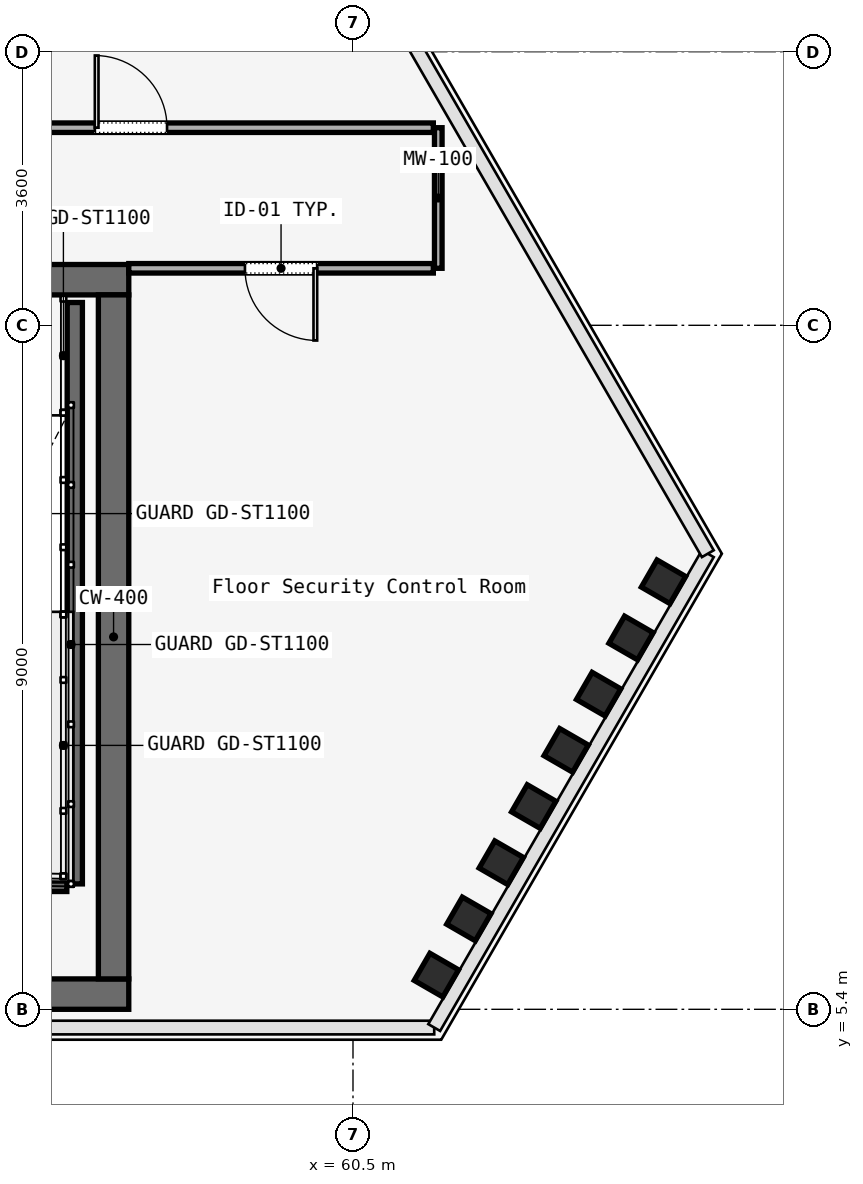
"""IFC4 building model, lengths in metres.
Left out: names, types, materials, properties, quantities, classifications, styles, units other than length and angle.
Written with IfcOpenShell. Run it as: python <this file> out.ifc"""

import sys

from ifc_helpers import new_model, si_unit, direction, frame, frame_2d, origin, origin_2d, place, context, subcontext, project, spatial, rectangle, i_section, extrude, element, fill, save


model = new_model("IFC4")
c1 = context("Model", 3, precision=1e-05, world=origin(), true_north=direction((0.0, 1.0)))
c2 = subcontext(c1, "Body", "Model", "MODEL_VIEW")
j1 = project(units=[si_unit("LENGTHUNIT", "METRE"), si_unit("PLANEANGLEUNIT", "RADIAN")], contexts=[c1])
p1 = place(None, origin())
s1 = spatial("IfcSite", under=j1, at=p1, CompositionType="ELEMENT")
p2 = place(p1, origin())
s2 = spatial("IfcBuilding", under=s1, at=p2, CompositionType="ELEMENT")
p3 = place(p2, frame((0.0, 0.0, 233.2)))
s3 = spatial("IfcBuildingStorey", under=s2, at=p3, CompositionType="ELEMENT", Elevation=233.2)
p4 = place(p3, frame((26.45, 15.0, 0.0), z_axis=(0.0, 0.0, 1.0), x_axis=(1.0, 0.0, 0.0)))
e1 = element("IfcWall", 1, at=p4, inside=s3, PredefinedType="SOLIDWALL", context=c2, shape_type="SweptSolid", body=[
    extrude(rectangle(XDim=31.1, YDim=0.4, at=frame_2d((15.55, 0.0))), origin(), (0.0, 0.0, 1.0), 3.58),
])
p5 = place(p4, frame((1.65, 0.0, 0.0)))
e2 = element("IfcOpeningElement", 2, at=p5, cuts=e1, PredefinedType="OPENING", context=c2, shape_type="SweptSolid", body=[
    extrude(rectangle(XDim=1.1, YDim=2.2, at=frame_2d((0.55, 1.1))), frame((0.0, 0.2, 0.0), z_axis=(0.0, -1.0, 0.0), x_axis=(1.0, 0.0, 0.0)), (0.0, 0.0, 1.0), 0.4),
])
p6 = place(p4, frame((13.65, 0.0, 0.0)))
e3 = element("IfcOpeningElement", 3, at=p6, cuts=e1, PredefinedType="OPENING", context=c2, shape_type="SweptSolid", body=[
    extrude(rectangle(XDim=1.1, YDim=2.2, at=frame_2d((0.55, 1.1))), frame((0.0, 0.2, 0.0), z_axis=(0.0, -1.0, 0.0), x_axis=(1.0, 0.0, 0.0)), (0.0, 0.0, 1.0), 0.4),
])
p7 = place(p4, frame((25.55, 0.0, 0.0)))
e4 = element("IfcOpeningElement", 4, at=p7, cuts=e1, PredefinedType="OPENING", context=c2, shape_type="SweptSolid", body=[
    extrude(rectangle(XDim=1.1, YDim=2.2, at=frame_2d((0.55, 1.1))), frame((0.0, 0.2, 0.0), z_axis=(0.0, -1.0, 0.0), x_axis=(1.0, 0.0, 0.0)), (0.0, 0.0, 1.0), 0.4),
])
p8 = place(p4, frame((19.35, 0.0, 0.0)))
e5 = element("IfcOpeningElement", 5, at=p8, cuts=e1, PredefinedType="OPENING", context=c2, shape_type="SweptSolid", body=[
    extrude(rectangle(XDim=1.1, YDim=2.2, at=frame_2d((0.55, 1.1))), frame((0.0, 0.2, 0.0), z_axis=(0.0, -1.0, 0.0), x_axis=(1.0, 0.0, 0.0)), (0.0, 0.0, 1.0), 0.4),
])
p9 = place(p4, frame((21.4, 0.0, 0.0)))
e6 = element("IfcOpeningElement", 6, at=p9, cuts=e1, PredefinedType="OPENING", context=c2, shape_type="SweptSolid", body=[
    extrude(rectangle(XDim=0.9, YDim=2.1, at=frame_2d((0.45, 1.05))), frame((0.0, 0.2, 0.0), z_axis=(0.0, -1.0, 0.0), x_axis=(1.0, 0.0, 0.0)), (0.0, 0.0, 1.0), 0.4),
])
p10 = place(p4, frame((5.14, 0.0, 0.0)))
e7 = element("IfcOpeningElement", 7, at=p10, cuts=e1, PredefinedType="OPENING", context=c2, shape_type="SweptSolid", body=[
    extrude(rectangle(XDim=0.95, YDim=2.2, at=frame_2d((0.475, 1.1))), frame((0.0, 0.2, 0.0), z_axis=(0.0, -1.0, 0.0), x_axis=(1.0, 0.0, 0.0)), (0.0, 0.0, 1.0), 0.4),
])
p11 = place(p4, frame((7.825, 0.0, 0.0)))
e8 = element("IfcOpeningElement", 8, at=p11, cuts=e1, PredefinedType="OPENING", context=c2, shape_type="SweptSolid", body=[
    extrude(rectangle(XDim=0.95, YDim=2.2, at=frame_2d((0.475, 1.1))), frame((0.0, 0.2, 0.0), z_axis=(0.0, -1.0, 0.0), x_axis=(1.0, 0.0, 0.0)), (0.0, 0.0, 1.0), 0.4),
])
p12 = place(p4, frame((10.46, 0.0, 0.0)))
e9 = element("IfcOpeningElement", 9, at=p12, cuts=e1, PredefinedType="OPENING", context=c2, shape_type="SweptSolid", body=[
    extrude(rectangle(XDim=0.95, YDim=2.2, at=frame_2d((0.475, 1.1))), frame((0.0, 0.2, 0.0), z_axis=(0.0, -1.0, 0.0), x_axis=(1.0, 0.0, 0.0)), (0.0, 0.0, 1.0), 0.4),
])
p13 = place(p4, frame((23.35, 0.0, 0.0)))
e10 = element("IfcOpeningElement", 10, at=p13, cuts=e1, PredefinedType="OPENING", context=c2, shape_type="SweptSolid", body=[
    extrude(rectangle(XDim=1.3, YDim=2.3, at=frame_2d((0.65, 1.15))), frame((0.0, 0.2, 0.0), z_axis=(0.0, -1.0, 0.0), x_axis=(1.0, 0.0, 0.0)), (0.0, 0.0, 1.0), 0.4),
])
p14 = place(p3, frame((26.45, 5.6, 0.0), z_axis=(0.0, 0.0, 1.0), x_axis=(1.0, 0.0, 0.0)))
e11 = element("IfcWall", 11, at=p14, inside=s3, PredefinedType="SOLIDWALL", context=c2, shape_type="SweptSolid", body=[
    extrude(rectangle(XDim=31.1, YDim=0.4, at=frame_2d((15.55, 0.0))), origin(), (0.0, 0.0, 1.0), 3.58),
])
p15 = place(p3, frame((57.35, 5.8, 0.0), z_axis=(0.0, 0.0, 1.0), x_axis=(0.0, 1.0, 0.0)))
e12 = element("IfcWall", 12, at=p15, inside=s3, PredefinedType="SOLIDWALL", context=c2, shape_type="SweptSolid", body=[
    extrude(rectangle(XDim=9.0, YDim=0.4, at=frame_2d((4.5, 0.0))), origin(), (0.0, 0.0, 1.0), 3.58),
])
for number, where, z_axis, x_axis in (
    (13, (61.597, 5.85, 0.0), (0.0, 0.0, 1.0), (0.5, 0.866, 0.0)),
    (14, (62.024, 6.589, 0.0), (0.0, 0.0, 1.0), (0.5, 0.866, 0.0)),
    (15, (62.451, 7.328, 0.0), (0.0, 0.0, 1.0), (0.5, 0.866, 0.0)),
    (16, (62.878, 8.068, 0.0), (0.0, 0.0, 1.0), (0.5, 0.866, 0.0)),
    (17, (63.305, 8.807, 0.0), (0.0, 0.0, 1.0), (0.5, 0.866, 0.0)),
    (18, (63.732, 9.546, 0.0), (0.0, 0.0, 1.0), (0.5, 0.866, 0.0)),
    (19, (64.158, 10.286, 0.0), (0.0, 0.0, 1.0), (0.5, 0.866, 0.0)),
    (20, (64.585, 11.025, 0.0), (0.0, 0.0, 1.0), (0.5, 0.866, 0.0)),
):
    element("IfcColumn", number, at=place(p3, frame(where, z_axis=z_axis, x_axis=x_axis)), inside=s3, PredefinedType="COLUMN", context=c2, shape_type="SweptSolid", body=[
        extrude(i_section(OverallWidth=0.412, OverallDepth=0.435, WebThickness=0.036, FlangeThickness=0.044, FilletRadius=0.015, at=origin_2d()), origin(), (0.0, 0.0, 1.0), 3.58),
    ])
p16 = place(p3, frame((56.84, 14.7, 0.0), z_axis=(0.0, 0.0, 1.0), x_axis=(0.0, -1.0, 0.0)))
e21 = element("IfcWall", 21, at=p16, inside=s3, PredefinedType="SOLIDWALL", context=c2, shape_type="SweptSolid", body=[
    extrude(rectangle(XDim=7.65, YDim=0.2, at=frame_2d((3.825, 0.0))), origin(), (0.0, 0.0, 1.0), 3.8),
])
p17 = place(p3, frame((53.62, 7.05, 0.0), z_axis=(0.0, 0.0, 1.0), x_axis=(1.0, 0.0, 0.0)))
e22 = element("IfcWall", 22, at=p17, inside=s3, PredefinedType="SOLIDWALL", context=c2, shape_type="SweptSolid", body=[
    extrude(rectangle(XDim=3.115, YDim=0.2, at=frame_2d((1.558, 0.0))), origin(), (0.0, 0.0, 1.0), 3.8),
])
p18 = place(p3, frame((61.622, 17.0, 0.0), z_axis=(0.0, 0.0, 1.0), x_axis=(0.0, -1.0, 0.0)))
e23 = element("IfcWall", 23, at=p18, inside=s3, PredefinedType="MOVABLE", context=c2, shape_type="SweptSolid", body=[
    extrude(rectangle(XDim=1.85, YDim=0.1, at=frame_2d((0.925, 0.0))), origin(), (0.0, 0.0, 1.0), 3.01),
])
p19 = place(p3, frame((61.557, 15.15, 0.0), z_axis=(0.0, 0.0, 1.0), x_axis=(-1.0, 0.0, 0.0)))
e24 = element("IfcWall", 24, at=p19, inside=s3, PredefinedType="PARTITIONING", context=c2, shape_type="SweptSolid", body=[
    extrude(rectangle(XDim=4.007, YDim=0.125, at=frame_2d((2.003, 0.0))), origin(), (0.0, 0.0, 1.0), 3.01),
])
p20 = place(p19, frame((1.529, 0.0, 0.0)))
e25 = element("IfcOpeningElement", 25, at=p20, cuts=e24, PredefinedType="OPENING", context=c2, shape_type="SweptSolid", body=[
    extrude(rectangle(XDim=0.95, YDim=2.2, at=frame_2d((0.475, 1.1))), frame((0.0, 0.062, 0.0), z_axis=(0.0, -1.0, 0.0), x_axis=(1.0, 0.0, 0.0)), (0.0, 0.0, 1.0), 0.125),
])
p21 = place(p3, frame((53.6, 17.0, 0.0), z_axis=(0.0, 0.0, 1.0), x_axis=(1.0, 0.0, 0.0)))
e26 = element("IfcWall", 26, at=p21, inside=s3, PredefinedType="PARTITIONING", context=c2, shape_type="SweptSolid", body=[
    extrude(rectangle(XDim=7.957, YDim=0.125, at=frame_2d((3.979, 0.0))), origin(), (0.0, 0.0, 1.0), 3.01),
])
p22 = place(p21, frame((3.503, 0.0, 0.0)))
e27 = element("IfcOpeningElement", 27, at=p22, cuts=e26, PredefinedType="OPENING", context=c2, shape_type="SweptSolid", body=[
    extrude(rectangle(XDim=0.95, YDim=2.2, at=frame_2d((0.475, 1.1))), frame((0.0, 0.062, 0.0), z_axis=(0.0, -1.0, 0.0), x_axis=(1.0, 0.0, 0.0)), (0.0, 0.0, 1.0), 0.125),
])
p23 = place(p20, origin())
e28 = element("IfcDoor", 28, at=p23, inside=s3, OperationType="SINGLE_SWING_RIGHT", PredefinedType="DOOR", context=c2, shape_type="SweptSolid", body=[
    extrude(rectangle(XDim=0.95, YDim=2.2, at=frame_2d((0.475, 1.1))), frame((0.0, 0.025, 0.0), z_axis=(0.0, -1.0, 0.0), x_axis=(1.0, 0.0, 0.0)), (0.0, 0.0, 1.0), 0.05),
])
fill(e25, e28)
p24 = place(p22, origin())
e29 = element("IfcDoor", 29, at=p24, inside=s3, OperationType="SINGLE_SWING_LEFT", PredefinedType="DOOR", context=c2, shape_type="SweptSolid", body=[
    extrude(rectangle(XDim=0.95, YDim=2.2, at=frame_2d((0.475, 1.1))), frame((0.0, 0.025, 0.0), z_axis=(0.0, -1.0, 0.0), x_axis=(1.0, 0.0, 0.0)), (0.0, 0.0, 1.0), 0.05),
])
fill(e27, e29)
save(model, sys.argv[1])
